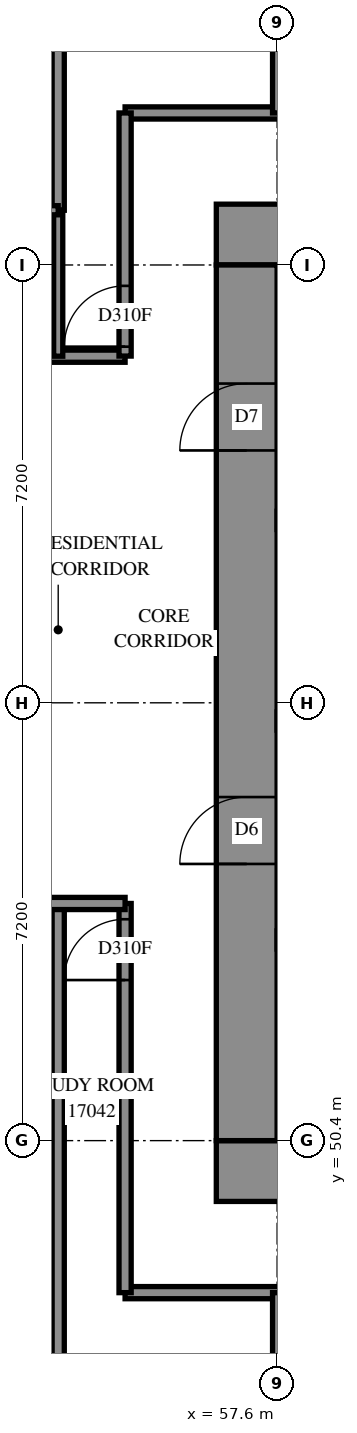
"""IFC4 building model, lengths in metres.
Left out: names, types, materials, properties, quantities, classifications, styles, units other than length and angle.
Written with IfcOpenShell. Run it as: python <this file> out.ifc"""

import sys

from ifc_helpers import new_model, si_unit, direction, frame, frame_2d, origin, place, context, subcontext, project, spatial, rectangle, extrude, element, fill, save


model = new_model("IFC4")
c1 = context("Model", 3, precision=1e-05, world=origin(), true_north=direction((0.0, 1.0)))
c2 = subcontext(c1, "Body", "Model", "MODEL_VIEW")
j1 = project(units=[si_unit("LENGTHUNIT", "METRE"), si_unit("PLANEANGLEUNIT", "RADIAN")], contexts=[c1])
p1 = place(None, origin())
s1 = spatial("IfcSite", under=j1, at=p1, CompositionType="ELEMENT")
p2 = place(p1, origin())
s2 = spatial("IfcBuilding", under=s1, at=p2, CompositionType="ELEMENT")
p3 = place(p2, frame((0.0, 0.0, 64.4)))
s3 = spatial("IfcBuildingStorey", under=s2, at=p3, CompositionType="ELEMENT", Elevation=64.4)
p4 = place(p3, frame((56.6, 49.9, -0.3), z_axis=(0.0, 0.0, 1.0), x_axis=(1.0, 0.0, 0.0)))
e1 = element("IfcWall", 1, at=p4, inside=s3, PredefinedType="SHEAR", context=c2, shape_type="SweptSolid", body=[
    extrude(rectangle(XDim=16.4, YDim=1.0, at=frame_2d((8.2, 0.0))), origin(), (0.0, 0.0, 1.0), 2.7),
])
p5 = place(p3, frame((56.6, 65.3, -0.3), z_axis=(0.0, 0.0, 1.0), x_axis=(1.0, 0.0, 0.0)))
e2 = element("IfcWall", 2, at=p5, inside=s3, PredefinedType="SHEAR", context=c2, shape_type="SweptSolid", body=[
    extrude(rectangle(XDim=16.4, YDim=1.0, at=frame_2d((8.2, 0.0))), origin(), (0.0, 0.0, 1.0), 2.7),
])
p6 = place(p5, frame((11.0, 0.0, 0.3)))
e3 = element("IfcOpeningElement", 3, at=p6, cuts=e2, PredefinedType="OPENING", context=c2, shape_type="SweptSolid", body=[
    extrude(rectangle(XDim=0.8, YDim=2.1, at=frame_2d((0.4, 1.05))), frame((0.0, 0.51, 0.0), z_axis=(0.0, -1.0, 0.0), x_axis=(1.0, 0.0, 0.0)), (0.0, 0.0, 1.0), 1.02),
])
p7 = place(p3, frame((57.1, 50.4, -0.3), z_axis=(0.0, 0.0, 1.0), x_axis=(0.0, 1.0, 0.0)))
e4 = element("IfcWall", 4, at=p7, inside=s3, PredefinedType="SHEAR", context=c2, shape_type="SweptSolid", body=[
    extrude(rectangle(XDim=14.4, YDim=1.0, at=frame_2d((7.2, 0.0))), origin(), (0.0, 0.0, 1.0), 2.7),
])
p8 = place(p7, frame((4.55, 0.0, 0.3)))
e5 = element("IfcOpeningElement", 5, at=p8, cuts=e4, PredefinedType="OPENING", context=c2, shape_type="SweptSolid", body=[
    extrude(rectangle(XDim=1.1, YDim=2.1, at=frame_2d((0.55, 1.05))), frame((0.0, 0.51, 0.0), z_axis=(0.0, -1.0, 0.0), x_axis=(1.0, 0.0, 0.0)), (0.0, 0.0, 1.0), 1.02),
])
p9 = place(p7, frame((11.35, 0.0, 0.3)))
e6 = element("IfcOpeningElement", 6, at=p9, cuts=e4, PredefinedType="OPENING", context=c2, shape_type="SweptSolid", body=[
    extrude(rectangle(XDim=1.1, YDim=2.1, at=frame_2d((0.55, 1.05))), frame((0.0, 0.51, 0.0), z_axis=(0.0, -1.0, 0.0), x_axis=(1.0, 0.0, 0.0)), (0.0, 0.0, 1.0), 1.02),
])
p10 = place(p3, frame((33.302, 63.3, 0.0), z_axis=(0.0, 0.0, 1.0), x_axis=(1.0, 0.0, 0.0)))
e7 = element("IfcWall", 7, at=p10, inside=s3, PredefinedType="PARTITIONING", context=c2, shape_type="SweptSolid", body=[
    extrude(rectangle(XDim=21.798, YDim=0.2, at=frame_2d((10.899, 0.0))), origin(), (0.0, 0.0, 1.0), 3.1),
])
p11 = place(p10, frame((1.091, 0.0, 0.0)))
e8 = element("IfcOpeningElement", 8, at=p11, cuts=e7, PredefinedType="OPENING", context=c2, shape_type="SweptSolid", body=[
    extrude(rectangle(XDim=0.9, YDim=2.1, at=frame_2d((0.45, 1.05))), frame((0.0, 0.11, 0.0), z_axis=(0.0, -1.0, 0.0), x_axis=(1.0, 0.0, 0.0)), (0.0, 0.0, 1.0), 0.22),
])
p12 = place(p10, frame((8.248, 0.0, 0.0)))
e9 = element("IfcOpeningElement", 9, at=p12, cuts=e7, PredefinedType="OPENING", context=c2, shape_type="SweptSolid", body=[
    extrude(rectangle(XDim=0.9, YDim=2.1, at=frame_2d((0.45, 1.05))), frame((0.0, 0.11, 0.0), z_axis=(0.0, -1.0, 0.0), x_axis=(1.0, 0.0, 0.0)), (0.0, 0.0, 1.0), 0.22),
])
p13 = place(p10, frame((15.448, 0.0, 0.0)))
e10 = element("IfcOpeningElement", 10, at=p13, cuts=e7, PredefinedType="OPENING", context=c2, shape_type="SweptSolid", body=[
    extrude(rectangle(XDim=0.9, YDim=2.1, at=frame_2d((0.45, 1.05))), frame((0.0, 0.11, 0.0), z_axis=(0.0, -1.0, 0.0), x_axis=(1.0, 0.0, 0.0)), (0.0, 0.0, 1.0), 0.22),
])
p14 = place(p3, frame((55.1, 67.3, 0.0), z_axis=(0.0, 0.0, 1.0), x_axis=(1.0, 0.0, 0.0)))
e11 = element("IfcWall", 11, at=p14, inside=s3, PredefinedType="PARTITIONING", context=c2, shape_type="SweptSolid", body=[
    extrude(rectangle(XDim=19.4, YDim=0.2, at=frame_2d((9.7, 0.0))), origin(), (0.0, 0.0, 1.0), 3.1),
])
p15 = place(p14, frame((6.361, 0.0, 0.0)))
e12 = element("IfcOpeningElement", 12, at=p15, cuts=e11, PredefinedType="OPENING", context=c2, shape_type="SweptSolid", body=[
    extrude(rectangle(XDim=0.9, YDim=2.1, at=frame_2d((0.45, 1.05))), frame((0.0, 0.11, 0.0), z_axis=(0.0, -1.0, 0.0), x_axis=(1.0, 0.0, 0.0)), (0.0, 0.0, 1.0), 0.22),
])
p16 = place(p14, frame((13.561, 0.0, 0.0)))
e13 = element("IfcOpeningElement", 13, at=p16, cuts=e11, PredefinedType="OPENING", context=c2, shape_type="SweptSolid", body=[
    extrude(rectangle(XDim=0.9, YDim=2.1, at=frame_2d((0.45, 1.05))), frame((0.0, 0.11, 0.0), z_axis=(0.0, -1.0, 0.0), x_axis=(1.0, 0.0, 0.0)), (0.0, 0.0, 1.0), 0.22),
])
p17 = place(p3, frame((55.1, 47.9, 0.0), z_axis=(0.0, 0.0, 1.0), x_axis=(1.0, 0.0, 0.0)))
e14 = element("IfcWall", 14, at=p17, inside=s3, PredefinedType="PARTITIONING", context=c2, shape_type="SweptSolid", body=[
    extrude(rectangle(XDim=19.208, YDim=0.2, at=frame_2d((9.604, 0.0))), origin(), (0.0, 0.0, 1.0), 3.1),
])
p18 = place(p17, frame((6.399, 0.0, 0.0)))
e15 = element("IfcOpeningElement", 15, at=p18, cuts=e14, PredefinedType="OPENING", context=c2, shape_type="SweptSolid", body=[
    extrude(rectangle(XDim=0.9, YDim=2.1, at=frame_2d((0.45, 1.05))), frame((0.0, 0.11, 0.0), z_axis=(0.0, -1.0, 0.0), x_axis=(1.0, 0.0, 0.0)), (0.0, 0.0, 1.0), 0.22),
])
p19 = place(p17, frame((13.561, 0.0, 0.0)))
e16 = element("IfcOpeningElement", 16, at=p19, cuts=e14, PredefinedType="OPENING", context=c2, shape_type="SweptSolid", body=[
    extrude(rectangle(XDim=0.9, YDim=2.1, at=frame_2d((0.45, 1.05))), frame((0.0, 0.11, 0.0), z_axis=(0.0, -1.0, 0.0), x_axis=(1.0, 0.0, 0.0)), (0.0, 0.0, 1.0), 0.22),
])
p20 = place(p3, frame((54.0, 42.3, 0.0), z_axis=(0.0, 0.0, 1.0), x_axis=(0.0, 1.0, 0.0)))
e17 = element("IfcWall", 17, at=p20, inside=s3, PredefinedType="PARTITIONING", context=c2, shape_type="SweptSolid", body=[
    extrude(rectangle(XDim=12.0, YDim=0.2, at=frame_2d((6.0, 0.0))), origin(), (0.0, 0.0, 1.0), 3.1),
])
p21 = place(p3, frame((54.0, 65.7, 0.0), z_axis=(0.0, 0.0, 1.0), x_axis=(0.0, 1.0, 0.0)))
e18 = element("IfcWall", 18, at=p21, inside=s3, PredefinedType="PARTITIONING", context=c2, shape_type="SweptSolid", body=[
    extrude(rectangle(XDim=7.025, YDim=0.2, at=frame_2d((3.513, 0.0))), origin(), (0.0, 0.0, 1.0), 3.1),
])
p22 = place(p3, frame((55.1, 47.9, 0.0), z_axis=(0.0, 0.0, 1.0), x_axis=(0.0, 1.0, 0.0)))
e19 = element("IfcWall", 19, at=p22, inside=s3, PredefinedType="PARTITIONING", context=c2, shape_type="SweptSolid", body=[
    extrude(rectangle(XDim=6.4, YDim=0.2, at=frame_2d((3.2, 0.0))), origin(), (0.0, 0.0, 1.0), 3.1),
])
p23 = place(p22, frame((5.141, 0.0, 0.0)))
e20 = element("IfcOpeningElement", 20, at=p23, cuts=e19, PredefinedType="OPENING", context=c2, shape_type="SweptSolid", body=[
    extrude(rectangle(XDim=1.0, YDim=2.1, at=frame_2d((0.5, 1.05))), frame((0.0, 0.11, 0.0), z_axis=(0.0, -1.0, 0.0), x_axis=(1.0, 0.0, 0.0)), (0.0, 0.0, 1.0), 0.22),
])
p24 = place(p3, frame((50.4, 54.3, 0.0), z_axis=(0.0, 0.0, 1.0), x_axis=(1.0, 0.0, 0.0)))
e21 = element("IfcWall", 21, at=p24, inside=s3, PredefinedType="PARTITIONING", context=c2, shape_type="SweptSolid", body=[
    extrude(rectangle(XDim=4.7, YDim=0.2, at=frame_2d((2.35, 0.0))), origin(), (0.0, 0.0, 1.0), 3.1),
])
p25 = place(p24, frame((2.3, 0.0, 0.0)))
e22 = element("IfcOpeningElement", 22, at=p25, cuts=e21, PredefinedType="OPENING", context=c2, shape_type="SweptSolid", body=[
    extrude(rectangle(XDim=0.9, YDim=2.1, at=frame_2d((0.45, 1.05))), frame((0.0, 0.11, 0.0), z_axis=(0.0, -1.0, 0.0), x_axis=(1.0, 0.0, 0.0)), (0.0, 0.0, 1.0), 0.22),
])
p26 = place(p3, frame((55.1, 63.302, 0.0), z_axis=(0.0, 0.0, 1.0), x_axis=(0.0, 1.0, 0.0)))
e23 = element("IfcWall", 23, at=p26, inside=s3, PredefinedType="PARTITIONING", context=c2, shape_type="SweptSolid", body=[
    extrude(rectangle(XDim=3.998, YDim=0.2, at=frame_2d((1.999, 0.0))), origin(), (0.0, 0.0, 1.0), 3.1),
])
p27 = place(p26, frame((0.154, 0.0, 0.0)))
e24 = element("IfcOpeningElement", 24, at=p27, cuts=e23, PredefinedType="OPENING", context=c2, shape_type="SweptSolid", body=[
    extrude(rectangle(XDim=1.0, YDim=2.1, at=frame_2d((0.5, 1.05))), frame((0.0, 0.11, 0.0), z_axis=(0.0, -1.0, 0.0), x_axis=(1.0, 0.0, 0.0)), (0.0, 0.0, 1.0), 0.22),
])
for number, where, z_axis, x_axis in (
    (25, (54.0, 63.3, 0.0), (0.0, 0.0, 1.0), (0.0, 1.0, 0.0)),
    (26, (57.6, 67.3, 0.0), (0.0, 0.0, 1.0), (0.0, 1.0, 0.0)),
    (27, (57.6, 45.5, 0.0), (0.0, 0.0, 1.0), (0.0, 1.0, 0.0)),
):
    element("IfcWall", number, at=place(p3, frame(where, z_axis=z_axis, x_axis=x_axis)), inside=s3, PredefinedType="PARTITIONING", context=c2, shape_type="SweptSolid", body=[
        extrude(rectangle(XDim=2.4, YDim=0.15, at=frame_2d((1.2, 0.0))), origin(), (0.0, 0.0, 1.0), 3.1),
    ])
p28 = place(p3, frame((52.1, 65.7, 0.0), z_axis=(0.0, 0.0, 1.0), x_axis=(1.0, 0.0, 0.0)))
e28 = element("IfcWall", 28, at=p28, inside=s3, PredefinedType="PARTITIONING", context=c2, shape_type="SweptSolid", body=[
    extrude(rectangle(XDim=1.9, YDim=0.15, at=frame_2d((0.95, 0.0))), origin(), (0.0, 0.0, 1.0), 3.1),
])
p29 = place(p28, frame((0.493, 0.0, 0.0)))
e29 = element("IfcOpeningElement", 29, at=p29, cuts=e28, PredefinedType="OPENING", context=c2, shape_type="SweptSolid", body=[
    extrude(rectangle(XDim=0.8, YDim=2.1, at=frame_2d((0.4, 1.05))), frame((0.0, 0.085, 0.0), z_axis=(0.0, -1.0, 0.0), x_axis=(1.0, 0.0, 0.0)), (0.0, 0.0, 1.0), 0.17),
])
p30 = place(p8, origin())
e30 = element("IfcDoor", 30, at=p30, inside=s3, OperationType="DOUBLE_DOOR_SINGLE_SWING", PredefinedType="DOOR", context=c2, shape_type="SweptSolid", body=[
    extrude(rectangle(XDim=1.1, YDim=2.1, at=frame_2d((0.55, 1.05))), frame((0.0, 0.025, 0.0), z_axis=(0.0, -1.0, 0.0), x_axis=(1.0, 0.0, 0.0)), (0.0, 0.0, 1.0), 0.05),
])
fill(e5, e30)
p31 = place(p9, origin())
e31 = element("IfcDoor", 31, at=p31, inside=s3, OperationType="SINGLE_SWING_LEFT", PredefinedType="DOOR", context=c2, shape_type="SweptSolid", body=[
    extrude(rectangle(XDim=1.1, YDim=2.1, at=frame_2d((0.55, 1.05))), frame((0.0, 0.025, 0.0), z_axis=(0.0, -1.0, 0.0), x_axis=(1.0, 0.0, 0.0)), (0.0, 0.0, 1.0), 0.05),
])
fill(e6, e31)
p32 = place(p27, origin())
e32 = element("IfcDoor", 32, at=p32, inside=s3, OperationType="SINGLE_SWING_LEFT", PredefinedType="DOOR", context=c2, shape_type="SweptSolid", body=[
    extrude(rectangle(XDim=1.0, YDim=2.1, at=frame_2d((0.5, 1.05))), frame((0.0, 0.025, 0.0), z_axis=(0.0, -1.0, 0.0), x_axis=(1.0, 0.0, 0.0)), (0.0, 0.0, 1.0), 0.05),
])
fill(e24, e32)
p33 = place(p23, origin())
e33 = element("IfcDoor", 33, at=p33, inside=s3, OperationType="SINGLE_SWING_RIGHT", PredefinedType="DOOR", context=c2, shape_type="SweptSolid", body=[
    extrude(rectangle(XDim=1.0, YDim=2.1, at=frame_2d((0.5, 1.05))), frame((0.0, 0.025, 0.0), z_axis=(0.0, -1.0, 0.0), x_axis=(1.0, 0.0, 0.0)), (0.0, 0.0, 1.0), 0.05),
])
fill(e20, e33)
save(model, sys.argv[1])
